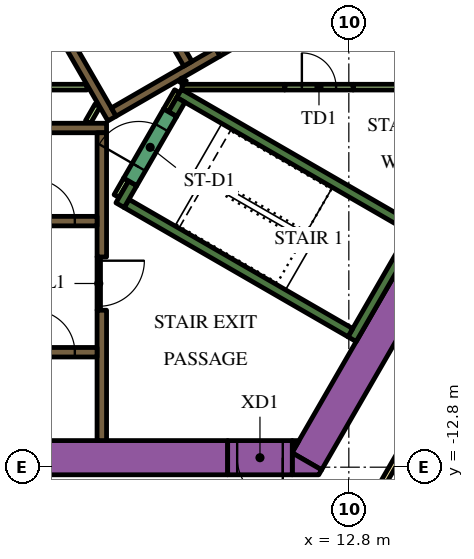
"""IFC4 building model, lengths in metres.
Left out: names, types, materials, properties, quantities, classifications, styles, units other than length and angle.
Written with IfcOpenShell. Run it as: python <this file> out.ifc"""

import sys

from ifc_helpers import new_model, si_unit, direction, frame, frame_2d, origin, place, context, subcontext, project, spatial, polyline, rectangle, outline, extrude, element, fill, save


model = new_model("IFC4")
c1 = context("Model", 3, precision=1e-05, world=origin(), true_north=direction((0.0, 1.0)))
c2 = subcontext(c1, "Body", "Model", "MODEL_VIEW")
j1 = project(units=[si_unit("LENGTHUNIT", "METRE"), si_unit("PLANEANGLEUNIT", "RADIAN")], contexts=[c1])
p1 = place(None, origin())
s1 = spatial("IfcSite", under=j1, at=p1, CompositionType="ELEMENT")
p2 = place(p1, origin())
s2 = spatial("IfcBuilding", under=s1, at=p2, CompositionType="ELEMENT")
p3 = place(p2, frame((0.0, 0.0, 126.6)))
s3 = spatial("IfcBuildingStorey", under=s2, at=p3, CompositionType="ELEMENT", Elevation=126.6)
p4 = place(p3, frame((6.776, 13.364, 0.0), z_axis=(0.0, 0.0, 1.0), x_axis=(0.500004177138, -0.8660229921, 0.0)))
e1 = element("IfcWall", 1, at=p4, inside=s3, PredefinedType="SOLIDWALL", context=c2, shape_type="SweptSolid", body=[
    extrude(rectangle(XDim=20.204, YDim=0.9, at=frame_2d((10.102, 0.0))), origin(), (0.0, 0.0, 1.0), 3.9),
])
p5 = place(p3, frame((11.695, -12.644, 0.0), z_axis=(0.0, 0.0, 1.0), x_axis=(0.500010229568, 0.86601949766, 0.0)))
e2 = element("IfcWall", 2, at=p5, inside=s3, PredefinedType="SOLIDWALL", context=c2, shape_type="SweptSolid", body=[
    extrude(rectangle(XDim=9.326, YDim=0.9, at=frame_2d((4.663, 0.0))), origin(), (0.0, 0.0, 1.0), 3.9),
])
p6 = place(p3, origin())
e3 = element("IfcWall", 3, at=p6, inside=s3, PredefinedType="SOLIDWALL", context=c2, shape_type="SweptSolid", body=[
    extrude(outline(polyline([(12.009, -13.0), (11.312, -13.0), (11.312, -12.425), (12.083, -12.871), (12.009, -13.0)])), origin(), (0.0, 0.0, 1.0), 3.9),
])
e4 = element("IfcWall", 4, at=p6, inside=s3, PredefinedType="SOLIDWALL", context=c2, shape_type="SweptSolid", body=[
    extrude(outline(polyline([(11.489, -12.1), (11.312, -12.407), (11.312, -12.1), (11.489, -12.1)])), origin(), (0.0, 0.0, 1.0), 3.9),
])
p7 = place(p3, frame((-12.019, -12.55, 0.0), z_axis=(0.0, 0.0, 1.0), x_axis=(1.0, 0.0, 0.0)))
e5 = element("IfcWall", 5, at=p7, inside=s3, PredefinedType="SOLIDWALL", context=c2, shape_type="SweptSolid", body=[
    extrude(rectangle(XDim=21.63, YDim=0.9, at=frame_2d((10.815, 0.0))), origin(), (0.0, 0.0, 1.0), 3.9),
])
p8 = place(p3, frame((12.885, -9.431, 0.0), z_axis=(0.0, 0.0, 1.0), x_axis=(0.500020560727, 0.866013532718, 0.0)))
e6 = element("IfcWall", 6, at=p8, inside=s3, PredefinedType="SOLIDWALL", context=c2, shape_type="SweptSolid", body=[
    extrude(rectangle(XDim=3.45, YDim=0.25, at=frame_2d((1.725, 0.0))), origin(), (0.0, 0.0, 1.0), 3.9),
])
p9 = place(p3, frame((12.84, -9.261, 0.0), z_axis=(0.0, 0.0, 1.0), x_axis=(-0.866013990052, 0.500019768644, 0.0)))
e7 = element("IfcWall", 7, at=p9, inside=s3, PredefinedType="SOLIDWALL", context=c2, shape_type="SweptSolid", body=[
    extrude(rectangle(XDim=6.8, YDim=0.25, at=frame_2d((3.4, 0.0))), origin(), (0.0, 0.0, 1.0), 3.9),
])
p10 = place(p3, frame((7.113, -5.33, 0.0), z_axis=(0.0, 0.0, 1.0), x_axis=(-0.499965889992, -0.866045096311, 0.0)))
e8 = element("IfcWall", 8, at=p10, inside=s3, PredefinedType="SOLIDWALL", context=c2, shape_type="SweptSolid", body=[
    extrude(rectangle(XDim=0.666, YDim=0.25, at=frame_2d((0.333, 0.0))), origin(), (0.0, 0.0, 1.0), 3.9),
])
p11 = place(p3, frame((8.334, -2.964, 0.0), z_axis=(0.0, 0.0, 1.0), x_axis=(0.866016039709, -0.500016218704, 0.0)))
e9 = element("IfcWall", 9, at=p11, inside=s3, PredefinedType="SOLIDWALL", context=c2, shape_type="SweptSolid", body=[
    extrude(rectangle(XDim=7.05, YDim=0.25, at=frame_2d((3.525, 0.0))), origin(), (0.0, 0.0, 1.0), 3.9),
])
p12 = place(p3, frame((8.163, -3.511, 0.0), z_axis=(0.0, 0.0, 1.0), x_axis=(0.500127794843, 0.865951608824, 0.0)))
e10 = element("IfcWall", 10, at=p12, inside=s3, PredefinedType="SOLIDWALL", context=c2, shape_type="SweptSolid", body=[
    extrude(rectangle(XDim=0.435, YDim=0.25, at=frame_2d((0.217, 0.0))), origin(), (0.0, 0.0, 1.0), 3.9),
])
p13 = place(p3, frame((-6.19, -3.875, 0.0), z_axis=(0.0, 0.0, 1.0), x_axis=(1.0, 0.0, 0.0)))
e11 = element("IfcWall", 11, at=p13, inside=s3, PredefinedType="SOLIDWALL", context=c2, shape_type="SweptSolid", body=[
    extrude(rectangle(XDim=12.615, YDim=0.25, at=frame_2d((6.307, 0.0))), origin(), (0.0, 0.0, 1.0), 3.9),
])
p14 = place(p3, frame((6.3, -8.67, 0.0), z_axis=(0.0, 0.0, 1.0), x_axis=(0.0, -1.0, 0.0)))
e12 = element("IfcWall", 12, at=p14, inside=s3, PredefinedType="SOLIDWALL", context=c2, shape_type="SweptSolid", body=[
    extrude(rectangle(XDim=3.43, YDim=0.25, at=frame_2d((1.715, 0.0))), origin(), (0.0, 0.0, 1.0), 3.9),
])
p15 = place(p3, frame((6.3, -7.268, 0.0), z_axis=(0.0, 0.0, 1.0), x_axis=(0.0, 1.0, 0.0)))
e13 = element("IfcWall", 13, at=p15, inside=s3, PredefinedType="SOLIDWALL", context=c2, shape_type="SweptSolid", body=[
    extrude(rectangle(XDim=3.268, YDim=0.25, at=frame_2d((1.634, 0.0))), origin(), (0.0, 0.0, 1.0), 3.9),
])
e14 = element("IfcWall", 14, at=p6, inside=s3, PredefinedType="SOLIDWALL", context=c2, shape_type="SweptSolid", body=[
    extrude(outline(polyline([(0.335, 6.925), (0.335, 6.925), (0.335, 7.075), (0.335, 7.075), (0.335, 7.075), (0.245, 7.075), (0.079, 7.363), (0.035, 7.439), (0.252, 7.564), (0.377, 7.348), (6.552, -3.348), (6.677, -3.564), (6.46, -3.689), (4.897, -0.981), (0.332, 6.925), (0.335, 6.925), (0.335, 6.925)])), origin(), (0.0, 0.0, 1.0), 3.9),
])
p16 = place(p3, frame((9.352, -1.875, 0.0), z_axis=(0.0, 0.0, 1.0), x_axis=(-0.866024844342, -0.500000968981, 0.0)))
e15 = element("IfcWall", 15, at=p16, inside=s3, PredefinedType="SOLIDWALL", context=c2, shape_type="SweptSolid", body=[
    extrude(rectangle(XDim=3.162, YDim=0.25, at=frame_2d((1.581, 0.0))), origin(), (0.0, 0.0, 1.0), 3.9),
])
p17 = place(p3, frame((6.688, -5.667, 0.0), z_axis=(0.0, 0.0, 1.0), x_axis=(0.499834152157, 0.86612113491, 0.0)))
e16 = element("IfcWall", 16, at=p17, inside=s3, PredefinedType="PARTITIONING", context=c2, shape_type="SweptSolid", body=[
    extrude(rectangle(XDim=0.505, YDim=0.15, at=frame_2d((0.252, 0.0))), origin(), (0.0, 0.0, 1.0), 2.75),
])
p18 = place(p3, frame((5.936, -3.718, 0.0), z_axis=(0.0, 0.0, 1.0), x_axis=(0.499890179513, 0.866088799389, 0.0)))
e17 = element("IfcWall", 17, at=p18, inside=s3, PredefinedType="PARTITIONING", context=c2, shape_type="SweptSolid", body=[
    extrude(rectangle(XDim=0.504, YDim=0.15, at=frame_2d((0.252, 0.0))), origin(), (0.0, 0.0, 1.0), 2.75),
])
p19 = place(p3, frame((8.412, -2.8, 0.0), z_axis=(0.0, 0.0, 1.0), x_axis=(1.0, 0.0, 0.0)))
e18 = element("IfcWall", 18, at=p19, inside=s3, PredefinedType="PARTITIONING", context=c2, shape_type="SweptSolid", body=[
    extrude(rectangle(XDim=2.702, YDim=0.15, at=frame_2d((1.351, 0.0))), origin(), (0.0, 0.0, 1.0), 3.9),
])
p20 = place(p3, frame((8.459, -2.599, 0.0), z_axis=(0.0, 0.0, 1.0), x_axis=(-0.501919277433, -0.864914469148, 0.0)))
e19 = element("IfcWall", 19, at=p20, inside=s3, PredefinedType="PARTITIONING", context=c2, shape_type="SweptSolid", body=[
    extrude(rectangle(XDim=0.109, YDim=0.15, at=frame_2d((0.054, 0.0))), origin(), (0.0, 0.0, 1.0), 3.9),
])
p21 = place(p3, frame((8.281, -2.907, 0.0), z_axis=(0.0, 0.0, 1.0), x_axis=(-0.500193841991, -0.86591346013, 0.0)))
e20 = element("IfcWall", 20, at=p21, inside=s3, PredefinedType="PARTITIONING", context=c2, shape_type="SweptSolid", body=[
    extrude(rectangle(XDim=0.583, YDim=0.15, at=frame_2d((0.292, 0.0))), origin(), (0.0, 0.0, 1.0), 3.9),
])
p22 = place(p3, frame((3.238, -2.8, 0.0), z_axis=(0.0, 0.0, 1.0), x_axis=(1.0, 0.0, 0.0)))
e21 = element("IfcWall", 21, at=p22, inside=s3, PredefinedType="PARTITIONING", context=c2, shape_type="SweptSolid", body=[
    extrude(rectangle(XDim=2.672, YDim=0.15, at=frame_2d((1.336, 0.0))), origin(), (0.0, 0.0, 1.0), 2.75),
])
p23 = place(p3, frame((12.915, -2.8, 0.0), z_axis=(0.0, 0.0, 1.0), x_axis=(1.0, 0.0, 0.0)))
e22 = element("IfcWall", 22, at=p23, inside=s3, PredefinedType="PARTITIONING", context=c2, shape_type="SweptSolid", body=[
    extrude(rectangle(XDim=2.637, YDim=0.15, at=frame_2d((1.318, 0.0))), origin(), (0.0, 0.0, 1.0), 2.75),
])
p24 = place(p3, frame((-6.175, -9.775, 0.0), z_axis=(0.0, 0.0, 1.0), x_axis=(1.0, 0.0, 0.0)))
e23 = element("IfcWall", 23, at=p24, inside=s3, PredefinedType="SOLIDWALL", context=c2, shape_type="SweptSolid", body=[
    extrude(rectangle(XDim=12.35, YDim=0.25, at=frame_2d((6.175, 0.0))), origin(), (0.0, 0.0, 1.0), 3.9),
])
p25 = place(p24, frame((0.585, 0.0, 0.0)))
e24 = element("IfcOpeningElement", 24, at=p25, cuts=e23, PredefinedType="OPENING", context=c2, shape_type="SweptSolid", body=[
    extrude(rectangle(XDim=1.1, YDim=2.1, at=frame_2d((0.55, 1.05))), frame((0.0, 0.135, 0.0), z_axis=(0.0, -1.0, 0.0), x_axis=(1.0, 0.0, 0.0)), (0.0, 0.0, 1.0), 0.27),
])
p26 = place(p24, frame((3.105, 0.0, 0.0)))
e25 = element("IfcOpeningElement", 25, at=p26, cuts=e23, PredefinedType="OPENING", context=c2, shape_type="SweptSolid", body=[
    extrude(rectangle(XDim=1.1, YDim=2.1, at=frame_2d((0.55, 1.05))), frame((0.0, 0.135, 0.0), z_axis=(0.0, -1.0, 0.0), x_axis=(1.0, 0.0, 0.0)), (0.0, 0.0, 1.0), 0.27),
])
p27 = place(p24, frame((5.625, 0.0, 0.0)))
e26 = element("IfcOpeningElement", 26, at=p27, cuts=e23, PredefinedType="OPENING", context=c2, shape_type="SweptSolid", body=[
    extrude(rectangle(XDim=1.1, YDim=2.1, at=frame_2d((0.55, 1.05))), frame((0.0, 0.135, 0.0), z_axis=(0.0, -1.0, 0.0), x_axis=(1.0, 0.0, 0.0)), (0.0, 0.0, 1.0), 0.27),
])
p28 = place(p24, frame((8.145, 0.0, 0.0)))
e27 = element("IfcOpeningElement", 27, at=p28, cuts=e23, PredefinedType="OPENING", context=c2, shape_type="SweptSolid", body=[
    extrude(rectangle(XDim=1.1, YDim=2.1, at=frame_2d((0.55, 1.05))), frame((0.0, 0.135, 0.0), z_axis=(0.0, -1.0, 0.0), x_axis=(1.0, 0.0, 0.0)), (0.0, 0.0, 1.0), 0.27),
])
p29 = place(p24, frame((10.665, 0.0, 0.0)))
e28 = element("IfcOpeningElement", 28, at=p29, cuts=e23, PredefinedType="OPENING", context=c2, shape_type="SweptSolid", body=[
    extrude(rectangle(XDim=1.1, YDim=2.1, at=frame_2d((0.55, 1.05))), frame((0.0, 0.135, 0.0), z_axis=(0.0, -1.0, 0.0), x_axis=(1.0, 0.0, 0.0)), (0.0, 0.0, 1.0), 0.27),
])
p30 = place(p3, frame((-6.175, -6.325, 0.0), z_axis=(0.0, 0.0, 1.0), x_axis=(1.0, 0.0, 0.0)))
e29 = element("IfcWall", 29, at=p30, inside=s3, PredefinedType="SOLIDWALL", context=c2, shape_type="SweptSolid", body=[
    extrude(rectangle(XDim=12.35, YDim=0.25, at=frame_2d((6.175, 0.0))), origin(), (0.0, 0.0, 1.0), 3.9),
])
p31 = place(p30, frame((3.205, 0.0, 0.0)))
e30 = element("IfcOpeningElement", 30, at=p31, cuts=e29, PredefinedType="OPENING", context=c2, shape_type="SweptSolid", body=[
    extrude(rectangle(XDim=0.9, YDim=2.1, at=frame_2d((0.45, 1.05))), frame((0.0, 0.135, 0.0), z_axis=(0.0, -1.0, 0.0), x_axis=(1.0, 0.0, 0.0)), (0.0, 0.0, 1.0), 0.27),
])
p32 = place(p30, frame((8.145, 0.0, 0.0)))
e31 = element("IfcOpeningElement", 31, at=p32, cuts=e29, PredefinedType="OPENING", context=c2, shape_type="SweptSolid", body=[
    extrude(rectangle(XDim=1.1, YDim=2.1, at=frame_2d((0.55, 1.05))), frame((0.0, 0.135, 0.0), z_axis=(0.0, -1.0, 0.0), x_axis=(1.0, 0.0, 0.0)), (0.0, 0.0, 1.0), 0.27),
])
p33 = place(p30, frame((10.665, 0.0, 0.0)))
e32 = element("IfcOpeningElement", 32, at=p33, cuts=e29, PredefinedType="OPENING", context=c2, shape_type="SweptSolid", body=[
    extrude(rectangle(XDim=1.1, YDim=2.1, at=frame_2d((0.55, 1.05))), frame((0.0, 0.135, 0.0), z_axis=(0.0, -1.0, 0.0), x_axis=(1.0, 0.0, 0.0)), (0.0, 0.0, 1.0), 0.27),
])
p34 = place(p3, frame((8.565, -2.185, 0.0), z_axis=(0.0, 0.0, 1.0), x_axis=(-0.499997954832, 0.866026584559, 0.0)))
e33 = element("IfcWall", 33, at=p34, inside=s3, PredefinedType="SOLIDWALL", context=c2, shape_type="SweptSolid", body=[
    extrude(rectangle(XDim=12.35, YDim=0.25, at=frame_2d((6.175, 0.0))), origin(), (0.0, 0.0, 1.0), 3.9),
])
p35 = place(p34, frame((5.725, 0.0, 0.0)))
e34 = element("IfcOpeningElement", 34, at=p35, cuts=e33, PredefinedType="OPENING", context=c2, shape_type="SweptSolid", body=[
    extrude(rectangle(XDim=0.9, YDim=2.1, at=frame_2d((0.45, 1.05))), frame((0.0, 0.135, 0.0), z_axis=(0.0, -1.0, 0.0), x_axis=(1.0, 0.0, 0.0)), (0.0, 0.0, 1.0), 0.27),
])
p36 = place(p3, frame((7.048, -5.292, 0.0), z_axis=(0.0, 0.0, 1.0), x_axis=(0.49994051562, 0.866059744384, 0.0)))
e35 = element("IfcWall", 35, at=p36, inside=s3, PredefinedType="SOLIDWALL", context=c2, shape_type="SweptSolid", body=[
    extrude(rectangle(XDim=2.1, YDim=0.4, at=frame_2d((1.05, 0.0))), origin(), (0.0, 0.0, 1.0), 3.9),
])
p37 = place(p36, frame((0.45, 0.0, 0.0)))
e36 = element("IfcOpeningElement", 36, at=p37, cuts=e35, PredefinedType="OPENING", context=c2, shape_type="SweptSolid", body=[
    extrude(rectangle(XDim=1.2, YDim=2.1, at=frame_2d((0.6, 1.05))), frame((0.0, 0.21, 0.0), z_axis=(0.0, -1.0, 0.0), x_axis=(1.0, 0.0, 0.0)), (0.0, 0.0, 1.0), 0.42),
])
p38 = place(p3, frame((6.22, -7.266, 0.0), z_axis=(0.0, 0.0, 1.0), x_axis=(0.0, -1.0, 0.0)))
e37 = element("IfcWall", 37, at=p38, inside=s3, PredefinedType="PARTITIONING", context=c2, shape_type="SweptSolid", body=[
    extrude(rectangle(XDim=1.4, YDim=0.09, at=frame_2d((0.7, 0.0))), origin(), (0.0, 0.0, 1.0), 2.75),
])
p39 = place(p38, frame((0.1, 0.0, 0.0)))
e38 = element("IfcOpeningElement", 38, at=p39, cuts=e37, PredefinedType="OPENING", context=c2, shape_type="SweptSolid", body=[
    extrude(rectangle(XDim=1.2, YDim=2.1, at=frame_2d((0.6, 1.05))), frame((0.0, 0.055, 0.0), z_axis=(0.0, -1.0, 0.0), x_axis=(1.0, 0.0, 0.0)), (0.0, 0.0, 1.0), 0.11),
])
p40 = place(p3, frame((11.312, -12.55, 0.0), z_axis=(0.0, 0.0, 1.0), x_axis=(-1.0, 0.0, 0.0)))
e39 = element("IfcWall", 39, at=p40, inside=s3, PredefinedType="SOLIDWALL", context=c2, shape_type="SweptSolid", body=[
    extrude(rectangle(XDim=1.7, YDim=0.9, at=frame_2d((0.85, 0.0))), origin(), (0.0, 0.0, 1.0), 3.9),
])
p41 = place(p40, frame((0.25, 0.0, 0.0)))
e40 = element("IfcOpeningElement", 40, at=p41, cuts=e39, PredefinedType="OPENING", context=c2, shape_type="SweptSolid", body=[
    extrude(rectangle(XDim=1.2, YDim=2.1, at=frame_2d((0.6, 1.05))), frame((0.0, 0.46, 0.0), z_axis=(0.0, -1.0, 0.0), x_axis=(1.0, 0.0, 0.0)), (0.0, 0.0, 1.0), 0.92),
])
p42 = place(p3, frame((9.352, -1.875, 0.0), z_axis=(0.0, 0.0, 1.0), x_axis=(0.865989075817, 0.500062916607, 0.0)))
e41 = element("IfcWall", 41, at=p42, inside=s3, PredefinedType="SOLIDWALL", context=c2, shape_type="SweptSolid", body=[
    extrude(rectangle(XDim=1.8, YDim=0.25, at=frame_2d((0.9, 0.0))), origin(), (0.0, 0.0, 1.0), 3.9),
])
p43 = place(p42, frame((0.45, 0.0, 0.0)))
e42 = element("IfcOpeningElement", 42, at=p43, cuts=e41, PredefinedType="OPENING", context=c2, shape_type="SweptSolid", body=[
    extrude(rectangle(XDim=0.9, YDim=2.1, at=frame_2d((0.45, 1.05))), frame((0.0, 0.135, 0.0), z_axis=(0.0, -1.0, 0.0), x_axis=(1.0, 0.0, 0.0)), (0.0, 0.0, 1.0), 0.27),
])
p44 = place(p3, frame((11.115, -2.8, 0.0), z_axis=(0.0, 0.0, 1.0), x_axis=(1.0, 0.0, 0.0)))
e43 = element("IfcWall", 43, at=p44, inside=s3, PredefinedType="PARTITIONING", context=c2, shape_type="SweptSolid", body=[
    extrude(rectangle(XDim=1.8, YDim=0.15, at=frame_2d((0.9, 0.0))), origin(), (0.0, 0.0, 1.0), 2.75),
])
p45 = place(p44, frame((0.45, 0.0, 0.0)))
e44 = element("IfcOpeningElement", 44, at=p45, cuts=e43, PredefinedType="OPENING", context=c2, shape_type="SweptSolid", body=[
    extrude(rectangle(XDim=0.9, YDim=2.1, at=frame_2d((0.45, 1.05))), frame((0.0, 0.085, 0.0), z_axis=(0.0, -1.0, 0.0), x_axis=(1.0, 0.0, 0.0)), (0.0, 0.0, 1.0), 0.17),
])
p46 = place(p3, frame((6.163, 18.475, 0.0), z_axis=(0.0, 0.0, 1.0), x_axis=(0.500001317485, -0.866024643133, 0.0)))
e45 = element("IfcWall", 45, at=p46, inside=s3, PredefinedType="PARTITIONING", context=c2, shape_type="SweptSolid", body=[
    extrude(rectangle(XDim=25.767, YDim=0.15, at=frame_2d((12.883, 0.0))), origin(), (0.0, 0.0, 1.0), 2.75),
])
p47 = place(p46, frame((19.306, 0.0, 0.0)))
e46 = element("IfcOpeningElement", 46, at=p47, cuts=e45, PredefinedType="OPENING", context=c2, shape_type="SweptSolid", body=[
    extrude(rectangle(XDim=1.0, YDim=2.1, at=frame_2d((0.5, 1.05))), frame((0.0, 0.085, 0.0), z_axis=(0.0, -1.0, 0.0), x_axis=(1.0, 0.0, 0.0)), (0.0, 0.0, 1.0), 0.17),
])
p48 = place(p46, frame((17.999, 0.0, 0.0)))
e47 = element("IfcOpeningElement", 47, at=p48, cuts=e45, PredefinedType="OPENING", context=c2, shape_type="SweptSolid", body=[
    extrude(rectangle(XDim=1.0, YDim=2.1, at=frame_2d((0.5, 1.05))), frame((0.0, 0.085, 0.0), z_axis=(0.0, -1.0, 0.0), x_axis=(1.0, 0.0, 0.0)), (0.0, 0.0, 1.0), 0.17),
])
p49 = place(p46, frame((0.596, 0.0, 0.0)))
e48 = element("IfcOpeningElement", 48, at=p49, cuts=e45, PredefinedType="OPENING", context=c2, shape_type="SweptSolid", body=[
    extrude(rectangle(XDim=1.0, YDim=2.1, at=frame_2d((0.5, 1.05))), frame((0.0, 0.085, 0.0), z_axis=(0.0, -1.0, 0.0), x_axis=(1.0, 0.0, 0.0)), (0.0, 0.0, 1.0), 0.17),
])
p50 = place(p3, frame((15.587, -9.952, 0.0), z_axis=(0.0, 0.0, 1.0), x_axis=(-0.500016618951, -0.866015808616, 0.0)))
e49 = element("IfcWall", 49, at=p50, inside=s3, PredefinedType="PARTITIONING", context=c2, shape_type="SweptSolid", body=[
    extrude(rectangle(XDim=5.268, YDim=0.15, at=frame_2d((2.634, 0.0))), origin(), (0.0, 0.0, 1.0), 2.75),
])
p51 = place(p50, frame((4.088, 0.0, 0.0)))
e50 = element("IfcOpeningElement", 50, at=p51, cuts=e49, PredefinedType="OPENING", context=c2, shape_type="SweptSolid", body=[
    extrude(rectangle(XDim=1.0, YDim=2.1, at=frame_2d((0.5, 1.05))), frame((0.0, 0.085, 0.0), z_axis=(0.0, -1.0, 0.0), x_axis=(1.0, 0.0, 0.0)), (0.0, 0.0, 1.0), 0.17),
])
p52 = place(p29, origin())
e51 = element("IfcDoor", 51, at=p52, inside=s3, OperationType="DOUBLE_DOOR_SLIDING", PredefinedType="DOOR", context=c2, shape_type="SweptSolid", body=[
    extrude(rectangle(XDim=1.1, YDim=2.1, at=frame_2d((0.55, 1.05))), frame((0.0, 0.025, 0.0), z_axis=(0.0, -1.0, 0.0), x_axis=(1.0, 0.0, 0.0)), (0.0, 0.0, 1.0), 0.05),
])
fill(e28, e51)
p53 = place(p33, origin())
e52 = element("IfcDoor", 52, at=p53, inside=s3, OperationType="DOUBLE_DOOR_SLIDING", PredefinedType="DOOR", context=c2, shape_type="SweptSolid", body=[
    extrude(rectangle(XDim=1.1, YDim=2.1, at=frame_2d((0.55, 1.05))), frame((0.0, 0.025, 0.0), z_axis=(0.0, -1.0, 0.0), x_axis=(1.0, 0.0, 0.0)), (0.0, 0.0, 1.0), 0.05),
])
fill(e32, e52)
p54 = place(p37, origin())
e53 = element("IfcDoor", 53, at=p54, inside=s3, OperationType="SINGLE_SWING_LEFT", PredefinedType="DOOR", context=c2, shape_type="SweptSolid", body=[
    extrude(rectangle(XDim=1.2, YDim=2.1, at=frame_2d((0.6, 1.05))), frame((0.0, 0.025, 0.0), z_axis=(0.0, -1.0, 0.0), x_axis=(1.0, 0.0, 0.0)), (0.0, 0.0, 1.0), 0.05),
])
fill(e36, e53)
p55 = place(p39, origin())
e54 = element("IfcDoor", 54, at=p55, inside=s3, OperationType="SINGLE_SWING_LEFT", PredefinedType="DOOR", context=c2, shape_type="SweptSolid", body=[
    extrude(rectangle(XDim=1.2, YDim=2.1, at=frame_2d((0.6, 1.05))), frame((0.0, 0.025, 0.0), z_axis=(0.0, -1.0, 0.0), x_axis=(1.0, 0.0, 0.0)), (0.0, 0.0, 1.0), 0.05),
])
fill(e38, e54)
p56 = place(p41, origin())
e55 = element("IfcDoor", 55, at=p56, inside=s3, OperationType="SINGLE_SWING_LEFT", PredefinedType="DOOR", context=c2, shape_type="SweptSolid", body=[
    extrude(rectangle(XDim=1.2, YDim=2.1, at=frame_2d((0.6, 1.05))), frame((0.0, 0.025, 0.0), z_axis=(0.0, -1.0, 0.0), x_axis=(1.0, 0.0, 0.0)), (0.0, 0.0, 1.0), 0.05),
])
fill(e40, e55)
p57 = place(p45, origin())
e56 = element("IfcDoor", 56, at=p57, inside=s3, OperationType="SINGLE_SWING_LEFT", PredefinedType="DOOR", context=c2, shape_type="SweptSolid", body=[
    extrude(rectangle(XDim=0.9, YDim=2.1, at=frame_2d((0.45, 1.05))), frame((0.0, 0.025, 0.0), z_axis=(0.0, -1.0, 0.0), x_axis=(1.0, 0.0, 0.0)), (0.0, 0.0, 1.0), 0.05),
])
fill(e44, e56)
save(model, sys.argv[1])
